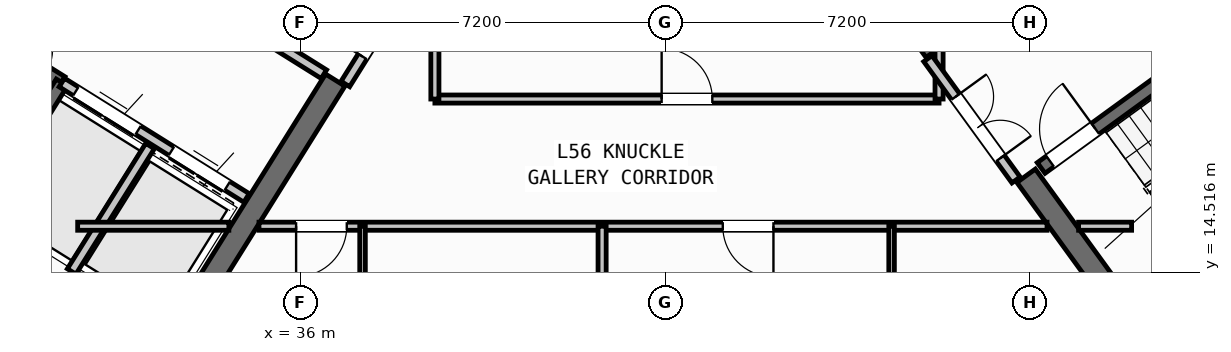
"""IFC4 building model, lengths in metres.
Left out: names, types, materials, properties, quantities, classifications, styles, units other than length and angle.
Written with IfcOpenShell. Run it as: python <this file> out.ifc"""

import sys

from ifc_helpers import new_model, si_unit, direction, frame, frame_2d, origin, place, context, subcontext, project, spatial, rectangle, extrude, source, transform, mapped, element, fill, save


model = new_model("IFC4")
c1 = context("Model", 3, precision=1e-05, world=origin(), true_north=direction((0.0, 1.0)))
c2 = subcontext(c1, "Body", "Model", "MODEL_VIEW")
j1 = project(units=[si_unit("LENGTHUNIT", "METRE"), si_unit("PLANEANGLEUNIT", "RADIAN")], contexts=[c1])
p1 = place(None, origin())
s1 = spatial("IfcSite", under=j1, at=p1, CompositionType="ELEMENT")
p2 = place(p1, origin())
s2 = spatial("IfcBuilding", under=s1, at=p2, CompositionType="ELEMENT")
p3 = place(p2, frame((0.0, 0.0, 222.0)))
s3 = spatial("IfcBuildingStorey", under=s2, at=p3, CompositionType="ELEMENT", Elevation=222.0)
p4 = place(p3, frame((33.324, 12.503, 0.0), z_axis=(0.0, 0.0, 1.0), x_axis=(-0.848043529849, 0.529926571782, 0.0)))
e1 = element("IfcWall", 1, at=p4, inside=s3, PredefinedType="SHEAR", context=c2, shape_type="SweptSolid", body=[
    extrude(rectangle(XDim=13.04, YDim=0.45, at=frame_2d((6.52, 0.0))), origin(), (0.0, 0.0, 1.0), 3.35),
])
p5 = place(p3, frame((36.683, 18.304, 0.0), z_axis=(0.0, 0.0, 1.0), x_axis=(-0.529904039071, -0.848057609704, 0.0)))
e2 = element("IfcWall", 2, at=p5, inside=s3, PredefinedType="SHEAR", context=c2, shape_type="SweptSolid", body=[
    extrude(rectangle(XDim=6.475, YDim=0.45, at=frame_2d((3.238, 0.0))), origin(), (0.0, 0.0, 1.0), 3.35),
])
p6 = place(p3, frame((52.399, 13.169, 0.0), z_axis=(0.0, 0.0, 1.0), x_axis=(0.809022352778, 0.587777877013, 0.0)))
e3 = element("IfcWall", 3, at=p6, inside=s3, PredefinedType="SHEAR", context=c2, shape_type="SweptSolid", body=[
    extrude(rectangle(XDim=12.24, YDim=0.45, at=frame_2d((6.12, 0.0))), origin(), (0.0, 0.0, 1.0), 3.35),
])
p7 = place(p3, frame((52.449, 13.483, 0.0), z_axis=(0.0, 0.0, 1.0), x_axis=(-0.587819244441, 0.808992296542, 0.0)))
e4 = element("IfcWall", 4, at=p7, inside=s3, PredefinedType="SHEAR", context=c2, shape_type="SweptSolid", body=[
    extrude(rectangle(XDim=3.625, YDim=0.45, at=frame_2d((1.812, 0.0))), origin(), (0.0, 0.0, 1.0), 3.35),
])
p8 = place(p3, frame((48.526, 18.884, 0.0), z_axis=(0.0, 0.0, 1.0), x_axis=(-0.587774812919, 0.809024578921, 0.0)))
e5 = element("IfcWall", 5, at=p8, inside=s3, PredefinedType="SHEAR", context=c2, shape_type="SweptSolid", body=[
    extrude(rectangle(XDim=6.475, YDim=0.45, at=frame_2d((3.238, 0.0))), origin(), (0.0, 0.0, 1.0), 3.35),
])
p9 = place(p3, frame((31.76, 12.183, 0.0), z_axis=(0.0, 0.0, 1.0), x_axis=(-0.848047074256, 0.529920899612, 0.0)))
e6 = element("IfcWall", 6, at=p9, inside=s3, PredefinedType="STANDARD", context=c2, shape_type="SweptSolid", body=[
    extrude(rectangle(XDim=30.652, YDim=0.32, at=frame_2d((15.326, 0.0))), origin(), (0.0, 0.0, 1.0), 3.35),
])
p10 = place(p9, frame((15.166, 0.0, 0.0)))
e7 = element("IfcOpeningElement", 7, at=p10, cuts=e6, PredefinedType="OPENING", context=c2, shape_type="SweptSolid", body=[
    extrude(rectangle(XDim=1.2, YDim=2.15, at=frame_2d((0.6, 1.075))), frame((0.0, 0.17, 0.0), z_axis=(0.0, -1.0, 0.0), x_axis=(1.0, 0.0, 0.0)), (0.0, 0.0, 1.0), 0.34),
])
p11 = place(p9, frame((2.24, 0.0, 0.9)))
e8 = element("IfcOpeningElement", 8, at=p11, cuts=e6, PredefinedType="OPENING", context=c2, shape_type="SweptSolid", body=[
    extrude(rectangle(XDim=1.65, YDim=1.45, at=frame_2d((0.825, 0.725))), frame((0.0, 0.17, 0.0), z_axis=(0.0, -1.0, 0.0), x_axis=(1.0, 0.0, 0.0)), (0.0, 0.0, 1.0), 0.34),
])
p12 = place(p9, frame((7.469, 0.0, 0.9)))
e9 = element("IfcOpeningElement", 9, at=p12, cuts=e6, PredefinedType="OPENING", context=c2, shape_type="SweptSolid", body=[
    extrude(rectangle(XDim=1.65, YDim=1.45, at=frame_2d((0.825, 0.725))), frame((0.0, 0.17, 0.0), z_axis=(0.0, -1.0, 0.0), x_axis=(1.0, 0.0, 0.0)), (0.0, 0.0, 1.0), 0.34),
])
p13 = place(p9, frame((12.623, 0.0, 1.0)))
e10 = element("IfcOpeningElement", 10, at=p13, cuts=e6, PredefinedType="OPENING", context=c2, shape_type="SweptSolid", body=[
    extrude(rectangle(XDim=0.9, YDim=1.25, at=frame_2d((0.45, 0.625))), frame((0.0, 0.17, 0.0), z_axis=(0.0, -1.0, 0.0), x_axis=(1.0, 0.0, 0.0)), (0.0, 0.0, 1.0), 0.34),
])
p14 = place(p9, frame((19.583, 0.0, 1.0)))
e11 = element("IfcOpeningElement", 11, at=p14, cuts=e6, PredefinedType="OPENING", context=c2, shape_type="SweptSolid", body=[
    extrude(rectangle(XDim=0.9, YDim=1.25, at=frame_2d((0.45, 0.625))), frame((0.0, 0.17, 0.0), z_axis=(0.0, -1.0, 0.0), x_axis=(1.0, 0.0, 0.0)), (0.0, 0.0, 1.0), 0.34),
])
p15 = place(p9, frame((22.033, 0.0, 1.0)))
e12 = element("IfcOpeningElement", 12, at=p15, cuts=e6, PredefinedType="OPENING", context=c2, shape_type="SweptSolid", body=[
    extrude(rectangle(XDim=0.9, YDim=1.25, at=frame_2d((0.45, 0.625))), frame((0.0, 0.17, 0.0), z_axis=(0.0, -1.0, 0.0), x_axis=(1.0, 0.0, 0.0)), (0.0, 0.0, 1.0), 0.34),
])
p16 = place(p9, frame((27.666, 0.0, 0.9)))
e13 = element("IfcOpeningElement", 13, at=p16, cuts=e6, PredefinedType="OPENING", context=c2, shape_type="SweptSolid", body=[
    extrude(rectangle(XDim=1.35, YDim=1.45, at=frame_2d((0.675, 0.725))), frame((0.0, 0.17, 0.0), z_axis=(0.0, -1.0, 0.0), x_axis=(1.0, 0.0, 0.0)), (0.0, 0.0, 1.0), 0.34),
])
p17 = place(p3, frame((31.28, 18.261, 0.0), z_axis=(0.0, 0.0, 1.0), x_axis=(-0.848051618787, 0.529913626805, 0.0)))
e14 = element("IfcWall", 14, at=p17, inside=s3, PredefinedType="SHEAR", context=c2, shape_type="SweptSolid", body=[
    extrude(rectangle(XDim=7.46, YDim=0.26, at=frame_2d((3.73, 0.0))), origin(), (0.0, 0.0, 1.0), 3.35),
])
p18 = place(p17, frame((0.36, 0.0, 0.0)))
e15 = element("IfcOpeningElement", 15, at=p18, cuts=e14, PredefinedType="OPENING", context=c2, shape_type="SweptSolid", body=[
    extrude(rectangle(XDim=0.86, YDim=2.05, at=frame_2d((0.43, 1.025))), frame((0.0, 0.14, 0.0), z_axis=(0.0, -1.0, 0.0), x_axis=(1.0, 0.0, 0.0)), (0.0, 0.0, 1.0), 0.28),
])
p19 = place(p3, frame((31.288, 18.256, 0.0), z_axis=(0.0, 0.0, 1.0), x_axis=(-0.529943379326, -0.848033026897, 0.0)))
e16 = element("IfcWall", 16, at=p19, inside=s3, PredefinedType="SHEAR", context=c2, shape_type="SweptSolid", body=[
    extrude(rectangle(XDim=3.16, YDim=0.26, at=frame_2d((1.58, 0.0))), origin(), (0.0, 0.0, 1.0), 3.35),
])
p20 = place(p3, frame((34.933, 15.978, 0.0), z_axis=(0.0, 0.0, 1.0), x_axis=(-0.848055739377, 0.529907032327, 0.0)))
e17 = element("IfcWall", 17, at=p20, inside=s3, PredefinedType="STANDARD", context=c2, shape_type="SweptSolid", body=[
    extrude(rectangle(XDim=4.298, YDim=0.2, at=frame_2d((2.149, 0.0))), origin(), (0.0, 0.0, 1.0), 3.34),
])
p21 = place(p20, frame((0.448, 0.0, 0.0)))
e18 = element("IfcOpeningElement", 18, at=p21, cuts=e17, PredefinedType="OPENING", context=c2, shape_type="SweptSolid", body=[
    extrude(rectangle(XDim=1.3, YDim=2.2, at=frame_2d((0.65, 1.1))), frame((0.0, 0.11, 0.0), z_axis=(0.0, -1.0, 0.0), x_axis=(1.0, 0.0, 0.0)), (0.0, 0.0, 1.0), 0.22),
])
p22 = place(p20, frame((2.523, 0.0, 0.0)))
e19 = element("IfcOpeningElement", 19, at=p22, cuts=e17, PredefinedType="OPENING", context=c2, shape_type="SweptSolid", body=[
    extrude(rectangle(XDim=1.45, YDim=2.25, at=frame_2d((0.725, 1.125))), frame((0.0, 0.11, 0.0), z_axis=(0.0, -1.0, 0.0), x_axis=(1.0, 0.0, 0.0)), (0.0, 0.0, 1.0), 0.22),
])
p23 = place(p3, frame((36.459, 18.421, 0.0), z_axis=(0.0, 0.0, 1.0), x_axis=(-0.848059591691, 0.529900867089, 0.0)))
e20 = element("IfcWall", 20, at=p23, inside=s3, PredefinedType="STANDARD", context=c2, shape_type="SweptSolid", body=[
    extrude(rectangle(XDim=5.818, YDim=0.2, at=frame_2d((2.909, 0.0))), origin(), (0.0, 0.0, 1.0), 3.34),
])
p24 = place(p23, frame((2.598, 0.0, 0.0)))
e21 = element("IfcOpeningElement", 21, at=p24, cuts=e20, PredefinedType="OPENING", context=c2, shape_type="SweptSolid", body=[
    extrude(rectangle(XDim=1.15, YDim=2.1, at=frame_2d((0.575, 1.05))), frame((0.0, 0.11, 0.0), z_axis=(0.0, -1.0, 0.0), x_axis=(1.0, 0.0, 0.0)), (0.0, 0.0, 1.0), 0.22),
])
p25 = place(p3, frame((33.029, 17.003, 0.0), z_axis=(0.0, 0.0, 1.0), x_axis=(-0.529916267533, -0.848049968695, 0.0)))
e22 = element("IfcWall", 22, at=p25, inside=s3, PredefinedType="STANDARD", context=c2, shape_type="SweptSolid", body=[
    extrude(rectangle(XDim=2.92, YDim=0.2, at=frame_2d((1.46, 0.0))), origin(), (0.0, 0.0, 1.0), 3.34),
])
p26 = place(p3, frame((52.472, 14.013, 0.0), z_axis=(0.0, 0.0, 1.0), x_axis=(0.809028366311, 0.587769599847, 0.0)))
e23 = element("IfcWall", 23, at=p26, inside=s3, PredefinedType="SHEAR", context=c2, shape_type="SweptSolid", body=[
    extrude(rectangle(XDim=7.33, YDim=0.26, at=frame_2d((3.665, 0.0))), origin(), (0.0, 0.0, 1.0), 3.35),
])
p27 = place(p3, frame((50.615, 16.57, 0.0), z_axis=(0.0, 0.0, 1.0), x_axis=(0.809028366311, 0.587769599847, 0.0)))
e24 = element("IfcWall", 24, at=p27, inside=s3, PredefinedType="SHEAR", context=c2, shape_type="SweptSolid", body=[
    extrude(rectangle(XDim=7.33, YDim=0.26, at=frame_2d((3.665, 0.0))), origin(), (0.0, 0.0, 1.0), 3.35),
])
p28 = place(p27, frame((0.22, 0.0, 0.0)))
e25 = element("IfcOpeningElement", 25, at=p28, cuts=e24, PredefinedType="OPENING", context=c2, shape_type="SweptSolid", body=[
    extrude(rectangle(XDim=1.1, YDim=2.1, at=frame_2d((0.55, 1.05))), frame((0.0, 0.14, 0.0), z_axis=(0.0, -1.0, 0.0), x_axis=(1.0, 0.0, 0.0)), (0.0, 0.0, 1.0), 0.28),
])
p29 = place(p3, frame((38.451, 20.737, 0.0), z_axis=(0.0, 0.0, 1.0), x_axis=(-0.529924799939, -0.848044637038, 0.0)))
e26 = element("IfcWall", 26, at=p29, inside=s3, PredefinedType="STANDARD", context=c2, shape_type="SweptSolid", body=[
    extrude(rectangle(XDim=2.96, YDim=0.2, at=frame_2d((1.48, 0.0))), origin(), (0.0, 0.0, 1.0), 3.34),
])
p30 = place(p29, frame((1.46, 0.0, 0.0)))
e27 = element("IfcOpeningElement", 27, at=p30, cuts=e26, PredefinedType="OPENING", context=c2, shape_type="SweptSolid", body=[
    extrude(rectangle(XDim=0.86, YDim=2.05, at=frame_2d((0.43, 1.025))), frame((0.0, 0.11, 0.0), z_axis=(0.0, -1.0, 0.0), x_axis=(1.0, 0.0, 0.0)), (0.0, 0.0, 1.0), 0.22),
])
p31 = place(p3, frame((31.6, 15.42, 0.0), z_axis=(0.0, 0.0, 1.0), x_axis=(1.0, 0.0, 0.0)))
e28 = element("IfcWall", 28, at=p31, inside=s3, PredefinedType="PARTITIONING", context=c2, shape_type="SweptSolid", body=[
    extrude(rectangle(XDim=2.984, YDim=0.16, at=frame_2d((1.492, 0.0))), origin(), (0.0, 0.0, 1.0), 3.34),
])
p32 = place(p3, frame((35.178, 15.42, 0.0), z_axis=(0.0, 0.0, 1.0), x_axis=(1.0, 0.0, 0.0)))
e29 = element("IfcWall", 29, at=p32, inside=s3, PredefinedType="PARTITIONING", context=c2, shape_type="SweptSolid", body=[
    extrude(rectangle(XDim=15.552, YDim=0.16, at=frame_2d((7.776, 0.0))), origin(), (0.0, 0.0, 1.0), 3.34),
])
p33 = place(p32, frame((0.733, 0.0, 0.0)))
e30 = element("IfcOpeningElement", 30, at=p33, cuts=e29, PredefinedType="OPENING", context=c2, shape_type="SweptSolid", body=[
    extrude(rectangle(XDim=1.0, YDim=2.1, at=frame_2d((0.5, 1.05))), frame((0.0, 0.09, 0.0), z_axis=(0.0, -1.0, 0.0), x_axis=(1.0, 0.0, 0.0)), (0.0, 0.0, 1.0), 0.18),
])
p34 = place(p32, frame((9.153, 0.0, 0.0)))
e31 = element("IfcOpeningElement", 31, at=p34, cuts=e29, PredefinedType="OPENING", context=c2, shape_type="SweptSolid", body=[
    extrude(rectangle(XDim=1.0, YDim=2.1, at=frame_2d((0.5, 1.05))), frame((0.0, 0.09, 0.0), z_axis=(0.0, -1.0, 0.0), x_axis=(1.0, 0.0, 0.0)), (0.0, 0.0, 1.0), 0.18),
])
p35 = place(p3, frame((51.354, 15.42, 0.0), z_axis=(0.0, 0.0, 1.0), x_axis=(1.0, 0.0, 0.0)))
e32 = element("IfcWall", 32, at=p35, inside=s3, PredefinedType="PARTITIONING", context=c2, shape_type="SweptSolid", body=[
    extrude(rectangle(XDim=1.046, YDim=0.16, at=frame_2d((0.523, 0.0))), origin(), (0.0, 0.0, 1.0), 3.34),
])
p36 = place(p3, frame((38.65, 17.93, 0.0), z_axis=(0.0, 0.0, 1.0), x_axis=(1.0, 0.0, 0.0)))
e33 = element("IfcWall", 33, at=p36, inside=s3, PredefinedType="PARTITIONING", context=c2, shape_type="SweptSolid", body=[
    extrude(rectangle(XDim=9.95, YDim=0.16, at=frame_2d((4.975, 0.0))), origin(), (0.0, 0.0, 1.0), 3.34),
])
p37 = place(p36, frame((4.475, 0.0, 0.0)))
e34 = element("IfcOpeningElement", 34, at=p37, cuts=e33, PredefinedType="OPENING", context=c2, shape_type="SweptSolid", body=[
    extrude(rectangle(XDim=1.0, YDim=2.1, at=frame_2d((0.5, 1.05))), frame((0.0, 0.09, 0.0), z_axis=(0.0, -1.0, 0.0), x_axis=(1.0, 0.0, 0.0)), (0.0, 0.0, 1.0), 0.18),
])
p38 = place(p3, frame((38.65, 17.93, 0.0), z_axis=(0.0, 0.0, 1.0), x_axis=(0.0, 1.0, 0.0)))
e35 = element("IfcWall", 35, at=p38, inside=s3, PredefinedType="PARTITIONING", context=c2, shape_type="SweptSolid", body=[
    extrude(rectangle(XDim=3.046, YDim=0.16, at=frame_2d((1.523, 0.0))), origin(), (0.0, 0.0, 1.0), 3.34),
])
p39 = place(p3, frame((48.6, 17.93, 0.0), z_axis=(0.0, 0.0, 1.0), x_axis=(0.0, 1.0, 0.0)))
e36 = element("IfcWall", 36, at=p39, inside=s3, PredefinedType="PARTITIONING", context=c2, shape_type="SweptSolid", body=[
    extrude(rectangle(XDim=0.993, YDim=0.16, at=frame_2d((0.496, 0.0))), origin(), (0.0, 0.0, 1.0), 3.34),
])
p40 = place(p3, frame((50.119, 16.333, 0.0), z_axis=(0.0, 0.0, 1.0), x_axis=(-0.587749856981, 0.809042709391, 0.0)))
e37 = element("IfcWall", 37, at=p40, inside=s3, PredefinedType="STANDARD", context=c2, shape_type="SweptSolid", body=[
    extrude(rectangle(XDim=2.96, YDim=0.2, at=frame_2d((1.48, 0.0))), origin(), (0.0, 0.0, 1.0), 3.34),
])
p41 = place(p40, frame((0.53, 0.0, 0.0)))
e38 = element("IfcOpeningElement", 38, at=p41, cuts=e37, PredefinedType="OPENING", context=c2, shape_type="SweptSolid", body=[
    extrude(rectangle(XDim=1.5, YDim=2.15, at=frame_2d((0.75, 1.075))), frame((0.0, 0.11, 0.0), z_axis=(0.0, -1.0, 0.0), x_axis=(1.0, 0.0, 0.0)), (0.0, 0.0, 1.0), 0.22),
])
p42 = place(p3, frame((41.95, 1.96, 0.0), z_axis=(0.0, 0.0, 1.0), x_axis=(0.0, 1.0, 0.0)))
e39 = element("IfcWall", 39, at=p42, inside=s3, PredefinedType="PARTITIONING", context=c2, shape_type="SweptSolid", body=[
    extrude(rectangle(XDim=13.46, YDim=0.16, at=frame_2d((6.73, 0.0))), origin(), (0.0, 0.0, 1.0), 3.34),
])
p43 = place(p3, frame((37.222, 1.96, 0.0), z_axis=(0.0, 0.0, 1.0), x_axis=(0.0, 1.0, 0.0)))
e40 = element("IfcWall", 40, at=p43, inside=s3, PredefinedType="PARTITIONING", context=c2, shape_type="SweptSolid", body=[
    extrude(rectangle(XDim=13.46, YDim=0.11, at=frame_2d((6.73, 0.0))), origin(), (0.0, 0.0, 1.0), 3.34),
])
p44 = place(p43, frame((5.2, 0.0, 0.0)))
e41 = element("IfcOpeningElement", 41, at=p44, cuts=e40, PredefinedType="OPENING", context=c2, shape_type="SweptSolid", body=[
    extrude(rectangle(XDim=0.92, YDim=2.08, at=frame_2d((0.46, 1.04))), frame((0.0, 0.065, 0.0), z_axis=(0.0, -1.0, 0.0), x_axis=(1.0, 0.0, 0.0)), (0.0, 0.0, 1.0), 0.13),
])
p45 = place(p43, frame((10.89, 0.0, 0.0)))
e42 = element("IfcOpeningElement", 42, at=p45, cuts=e40, PredefinedType="OPENING", context=c2, shape_type="SweptSolid", body=[
    extrude(rectangle(XDim=0.88, YDim=2.08, at=frame_2d((0.44, 1.04))), frame((0.0, 0.065, 0.0), z_axis=(0.0, -1.0, 0.0), x_axis=(1.0, 0.0, 0.0)), (0.0, 0.0, 1.0), 0.13),
])
p46 = place(p3, frame((47.663, 1.96, 0.0), z_axis=(0.0, 0.0, 1.0), x_axis=(0.0, 1.0, 0.0)))
e43 = element("IfcWall", 43, at=p46, inside=s3, PredefinedType="PARTITIONING", context=c2, shape_type="SweptSolid", body=[
    extrude(rectangle(XDim=13.46, YDim=0.11, at=frame_2d((6.73, 0.0))), origin(), (0.0, 0.0, 1.0), 3.34),
])
p47 = place(p46, frame((6.3, 0.0, 0.0)))
e44 = element("IfcOpeningElement", 44, at=p47, cuts=e43, PredefinedType="OPENING", context=c2, shape_type="SweptSolid", body=[
    extrude(rectangle(XDim=0.92, YDim=2.08, at=frame_2d((0.46, 1.04))), frame((0.0, 0.065, 0.0), z_axis=(0.0, -1.0, 0.0), x_axis=(1.0, 0.0, 0.0)), (0.0, 0.0, 1.0), 0.13),
])
p48 = place(p46, frame((11.54, 0.0, 0.0)))
e45 = element("IfcOpeningElement", 45, at=p48, cuts=e43, PredefinedType="OPENING", context=c2, shape_type="SweptSolid", body=[
    extrude(rectangle(XDim=0.88, YDim=2.08, at=frame_2d((0.44, 1.04))), frame((0.0, 0.065, 0.0), z_axis=(0.0, -1.0, 0.0), x_axis=(1.0, 0.0, 0.0)), (0.0, 0.0, 1.0), 0.13),
])
m1 = source(origin(), c2, "Body", "SweptSolid", [
    extrude(rectangle(XDim=1.3, YDim=2.2, at=frame_2d((0.65, 1.1))), frame((0.0, 0.025, 0.0), z_axis=(0.0, -1.0, 0.0), x_axis=(1.0, 0.0, 0.0)), (0.0, 0.0, 1.0), 0.05),
])
p49 = place(p21, origin())
e46 = element("IfcDoor", 46, at=p49, inside=s3, OperationType="DOUBLE_DOOR_SLIDING", PredefinedType="DOOR", context=c2, shape_type="MappedRepresentation", body=[
    mapped(m1, transform((0.0, 0.0, 0.0), scale=1.0)),
])
fill(e18, e46)
m2 = source(origin(), c2, "Body", "SweptSolid", [
    extrude(rectangle(XDim=1.45, YDim=2.25, at=frame_2d((0.725, 1.125))), frame((0.0, 0.025, 0.0), z_axis=(0.0, -1.0, 0.0), x_axis=(1.0, 0.0, 0.0)), (0.0, 0.0, 1.0), 0.05),
])
p50 = place(p22, origin())
e47 = element("IfcDoor", 47, at=p50, inside=s3, OperationType="DOUBLE_DOOR_SLIDING", PredefinedType="DOOR", context=c2, shape_type="MappedRepresentation", body=[
    mapped(m2, transform((0.0, 0.0, 0.0), scale=1.0)),
])
fill(e19, e47)
m3 = source(origin(), c2, "Body", "SweptSolid", [
    extrude(rectangle(XDim=1.1, YDim=2.1, at=frame_2d((0.55, 1.05))), frame((0.0, 0.025, 0.0), z_axis=(0.0, -1.0, 0.0), x_axis=(1.0, 0.0, 0.0)), (0.0, 0.0, 1.0), 0.05),
])
p51 = place(p28, origin())
e48 = element("IfcDoor", 48, at=p51, inside=s3, OperationType="SINGLE_SWING_RIGHT", PredefinedType="DOOR", context=c2, shape_type="MappedRepresentation", body=[
    mapped(m3, transform((0.0, 0.0, 0.0), scale=1.0)),
])
fill(e25, e48)
m4 = source(origin(), c2, "Body", "SweptSolid", [
    extrude(rectangle(XDim=1.0, YDim=2.1, at=frame_2d((0.5, 1.05))), frame((0.0, 0.025, 0.0), z_axis=(0.0, -1.0, 0.0), x_axis=(1.0, 0.0, 0.0)), (0.0, 0.0, 1.0), 0.05),
])
p52 = place(p37, origin())
e49 = element("IfcDoor", 49, at=p52, inside=s3, OperationType="SINGLE_SWING_LEFT", PredefinedType="DOOR", context=c2, shape_type="MappedRepresentation", body=[
    mapped(m4, transform((0.0, 0.0, 0.0), scale=1.0)),
])
fill(e34, e49)
m5 = source(origin(), c2, "Body", "SweptSolid", [
    extrude(rectangle(XDim=0.86, YDim=2.05, at=frame_2d((0.43, 1.025))), frame((0.0, 0.025, 0.0), z_axis=(0.0, -1.0, 0.0), x_axis=(1.0, 0.0, 0.0)), (0.0, 0.0, 1.0), 0.05),
])
p53 = place(p30, frame((0.86, 0.0, 0.0), z_axis=(0.0, 0.0, 1.0), x_axis=(-1.0, 0.0, 0.0)))
e50 = element("IfcDoor", 50, at=p53, inside=s3, OperationType="SINGLE_SWING_LEFT", PredefinedType="DOOR", context=c2, shape_type="MappedRepresentation", body=[
    mapped(m5, transform((0.0, 0.0, 0.0), scale=1.0)),
])
fill(e27, e50)
m6 = source(origin(), c2, "Body", "SweptSolid", [
    extrude(rectangle(XDim=1.5, YDim=2.15, at=frame_2d((0.75, 1.075))), frame((0.0, 0.025, 0.0), z_axis=(0.0, -1.0, 0.0), x_axis=(1.0, 0.0, 0.0)), (0.0, 0.0, 1.0), 0.05),
])
p54 = place(p41, frame((1.5, 0.0, 0.0), z_axis=(0.0, 0.0, 1.0), x_axis=(-1.0, 0.0, 0.0)))
e51 = element("IfcDoor", 51, at=p54, inside=s3, OperationType="DOUBLE_DOOR_SINGLE_SWING", PredefinedType="DOOR", context=c2, shape_type="MappedRepresentation", body=[
    mapped(m6, transform((0.0, 0.0, 0.0), scale=1.0)),
])
fill(e38, e51)
p55 = place(p33, frame((1.0, 0.0, 0.0), z_axis=(0.0, 0.0, 1.0), x_axis=(-1.0, 0.0, 0.0)))
e52 = element("IfcDoor", 52, at=p55, inside=s3, OperationType="SINGLE_SWING_RIGHT", PredefinedType="DOOR", context=c2, shape_type="MappedRepresentation", body=[
    mapped(m4, transform((0.0, 0.0, 0.0), scale=1.0)),
])
fill(e30, e52)
p56 = place(p34, frame((1.0, 0.0, 0.0), z_axis=(0.0, 0.0, 1.0), x_axis=(-1.0, 0.0, 0.0)))
e53 = element("IfcDoor", 53, at=p56, inside=s3, OperationType="SINGLE_SWING_LEFT", PredefinedType="DOOR", context=c2, shape_type="MappedRepresentation", body=[
    mapped(m4, transform((0.0, 0.0, 0.0), scale=1.0)),
])
fill(e31, e53)
save(model, sys.argv[1])
